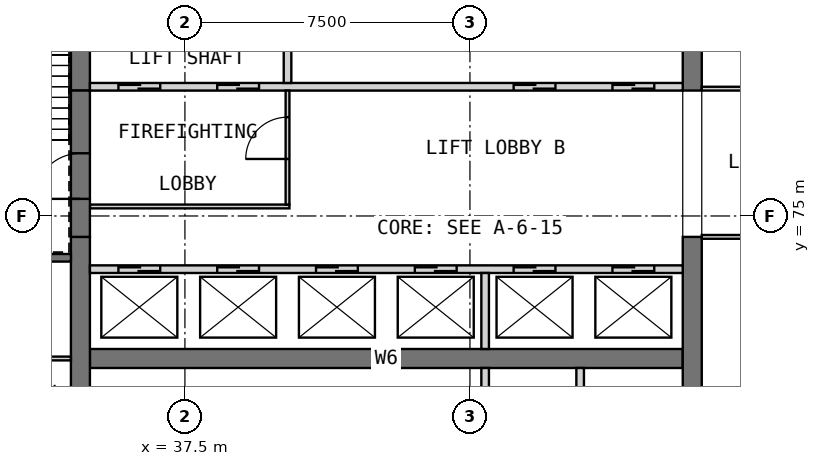
"""IFC4 building model, lengths in metres.
Left out: names, types, materials, properties, quantities, classifications, styles, units other than length and angle.
Written with IfcOpenShell. Run it as: python <this file> out.ifc"""

import sys

from ifc_helpers import new_model, si_unit, direction, frame, frame_2d, origin, place, context, subcontext, project, spatial, rectangle, extrude, element, fill, save


model = new_model("IFC4")
c1 = context("Model", 3, precision=1e-05, world=origin(), true_north=direction((0.0, 1.0)))
c2 = subcontext(c1, "Body", "Model", "MODEL_VIEW")
j1 = project(units=[si_unit("LENGTHUNIT", "METRE"), si_unit("PLANEANGLEUNIT", "RADIAN")], contexts=[c1])
p1 = place(None, origin())
s1 = spatial("IfcSite", under=j1, at=p1, CompositionType="ELEMENT")
p2 = place(p1, origin())
s2 = spatial("IfcBuilding", under=s1, at=p2, CompositionType="ELEMENT")
p3 = place(p2, frame((0.0, 0.0, 124.2)))
s3 = spatial("IfcBuildingStorey", under=s2, at=p3, CompositionType="ELEMENT", Elevation=124.2)
p4 = place(p3, frame((35.0, 71.25, 0.0), z_axis=(0.0, 0.0, 1.0), x_axis=(1.0, 0.0, 0.0)))
e1 = element("IfcWall", 1, at=p4, inside=s3, PredefinedType="SHEAR", context=c2, shape_type="SweptSolid", body=[
    extrude(rectangle(XDim=15.6, YDim=0.5, at=frame_2d((7.8, 0.0))), origin(), (0.0, 0.0, 1.0), 6.0),
])
p5 = place(p3, frame((34.75, 68.05, 0.0), z_axis=(0.0, 0.0, 1.0), x_axis=(0.0, 1.0, 0.0)))
e2 = element("IfcWall", 2, at=p5, inside=s3, PredefinedType="SHEAR", context=c2, shape_type="SweptSolid", body=[
    extrude(rectangle(XDim=6.4, YDim=0.5, at=frame_2d((3.2, 0.0))), origin(), (0.0, 0.0, 1.0), 6.0),
])
p6 = place(p3, frame((34.75, 78.3, 0.0), z_axis=(0.0, 0.0, 1.0), x_axis=(0.0, 1.0, 0.0)))
e3 = element("IfcWall", 3, at=p6, inside=s3, PredefinedType="SHEAR", context=c2, shape_type="SweptSolid", body=[
    extrude(rectangle(XDim=3.4, YDim=0.5, at=frame_2d((1.7, 0.0))), origin(), (0.0, 0.0, 1.0), 6.0),
])
p7 = place(p3, frame((50.85, 68.05, 0.0), z_axis=(0.0, 0.0, 1.0), x_axis=(0.0, 1.0, 0.0)))
e4 = element("IfcWall", 4, at=p7, inside=s3, PredefinedType="SHEAR", context=c2, shape_type="SweptSolid", body=[
    extrude(rectangle(XDim=6.4, YDim=0.5, at=frame_2d((3.2, 0.0))), origin(), (0.0, 0.0, 1.0), 6.0),
])
p8 = place(p3, frame((50.85, 78.3, 0.0), z_axis=(0.0, 0.0, 1.0), x_axis=(0.0, 1.0, 0.0)))
e5 = element("IfcWall", 5, at=p8, inside=s3, PredefinedType="SHEAR", context=c2, shape_type="SweptSolid", body=[
    extrude(rectangle(XDim=3.4, YDim=0.5, at=frame_2d((1.7, 0.0))), origin(), (0.0, 0.0, 1.0), 6.0),
])
for number, where, z_axis, x_axis in (
    (6, (45.4, 68.25, 0.0), (0.0, 0.0, 1.0), (0.0, 1.0, 0.0)),
    (7, (47.9, 68.25, 0.0), (0.0, 0.0, 1.0), (0.0, 1.0, 0.0)),
):
    element("IfcWall", number, at=place(p3, frame(where, z_axis=z_axis, x_axis=x_axis)), inside=s3, PredefinedType="SOLIDWALL", context=c2, shape_type="SweptSolid", body=[
        extrude(rectangle(XDim=2.75, YDim=0.2, at=frame_2d((1.375, 0.0))), origin(), (0.0, 0.0, 1.0), 6.0),
    ])
p9 = place(p3, frame((35.0, 73.6, 0.0), z_axis=(0.0, 0.0, 1.0), x_axis=(1.0, 0.0, 0.0)))
e8 = element("IfcWall", 8, at=p9, inside=s3, PredefinedType="SOLIDWALL", context=c2, shape_type="SweptSolid", body=[
    extrude(rectangle(XDim=15.6, YDim=0.2, at=frame_2d((7.8, 0.0))), origin(), (0.0, 0.0, 1.0), 6.0),
])
p10 = place(p9, frame((0.75, 0.0, 0.0)))
e9 = element("IfcOpeningElement", 9, at=p10, cuts=e8, PredefinedType="OPENING", context=c2, shape_type="SweptSolid", body=[
    extrude(rectangle(XDim=1.1, YDim=2.1, at=frame_2d((0.55, 1.05))), frame((0.0, 0.11, 0.0), z_axis=(0.0, -1.0, 0.0), x_axis=(1.0, 0.0, 0.0)), (0.0, 0.0, 1.0), 0.22),
])
p11 = place(p9, frame((3.35, 0.0, 0.0)))
e10 = element("IfcOpeningElement", 10, at=p11, cuts=e8, PredefinedType="OPENING", context=c2, shape_type="SweptSolid", body=[
    extrude(rectangle(XDim=1.1, YDim=2.1, at=frame_2d((0.55, 1.05))), frame((0.0, 0.11, 0.0), z_axis=(0.0, -1.0, 0.0), x_axis=(1.0, 0.0, 0.0)), (0.0, 0.0, 1.0), 0.22),
])
p12 = place(p9, frame((5.95, 0.0, 0.0)))
e11 = element("IfcOpeningElement", 11, at=p12, cuts=e8, PredefinedType="OPENING", context=c2, shape_type="SweptSolid", body=[
    extrude(rectangle(XDim=1.1, YDim=2.1, at=frame_2d((0.55, 1.05))), frame((0.0, 0.11, 0.0), z_axis=(0.0, -1.0, 0.0), x_axis=(1.0, 0.0, 0.0)), (0.0, 0.0, 1.0), 0.22),
])
p13 = place(p9, frame((8.55, 0.0, 0.0)))
e12 = element("IfcOpeningElement", 12, at=p13, cuts=e8, PredefinedType="OPENING", context=c2, shape_type="SweptSolid", body=[
    extrude(rectangle(XDim=1.1, YDim=2.1, at=frame_2d((0.55, 1.05))), frame((0.0, 0.11, 0.0), z_axis=(0.0, -1.0, 0.0), x_axis=(1.0, 0.0, 0.0)), (0.0, 0.0, 1.0), 0.22),
])
p14 = place(p9, frame((11.15, 0.0, 0.0)))
e13 = element("IfcOpeningElement", 13, at=p14, cuts=e8, PredefinedType="OPENING", context=c2, shape_type="SweptSolid", body=[
    extrude(rectangle(XDim=1.1, YDim=2.1, at=frame_2d((0.55, 1.05))), frame((0.0, 0.11, 0.0), z_axis=(0.0, -1.0, 0.0), x_axis=(1.0, 0.0, 0.0)), (0.0, 0.0, 1.0), 0.22),
])
p15 = place(p9, frame((13.75, 0.0, 0.0)))
e14 = element("IfcOpeningElement", 14, at=p15, cuts=e8, PredefinedType="OPENING", context=c2, shape_type="SweptSolid", body=[
    extrude(rectangle(XDim=1.1, YDim=2.1, at=frame_2d((0.55, 1.05))), frame((0.0, 0.11, 0.0), z_axis=(0.0, -1.0, 0.0), x_axis=(1.0, 0.0, 0.0)), (0.0, 0.0, 1.0), 0.22),
])
p16 = place(p3, frame((45.4, 71.5, 0.0), z_axis=(0.0, 0.0, 1.0), x_axis=(0.0, 1.0, 0.0)))
e15 = element("IfcWall", 15, at=p16, inside=s3, PredefinedType="SOLIDWALL", context=c2, shape_type="SweptSolid", body=[
    extrude(rectangle(XDim=2.0, YDim=0.2, at=frame_2d((1.0, 0.0))), origin(), (0.0, 0.0, 1.0), 6.0),
])
p17 = place(p3, frame((35.0, 78.4, 0.0), z_axis=(0.0, 0.0, 1.0), x_axis=(1.0, 0.0, 0.0)))
e16 = element("IfcWall", 16, at=p17, inside=s3, PredefinedType="SOLIDWALL", context=c2, shape_type="SweptSolid", body=[
    extrude(rectangle(XDim=15.6, YDim=0.2, at=frame_2d((7.8, 0.0))), origin(), (0.0, 0.0, 1.0), 6.0),
])
p18 = place(p17, frame((0.75, 0.0, 0.0)))
e17 = element("IfcOpeningElement", 17, at=p18, cuts=e16, PredefinedType="OPENING", context=c2, shape_type="SweptSolid", body=[
    extrude(rectangle(XDim=1.1, YDim=2.1, at=frame_2d((0.55, 1.05))), frame((0.0, 0.11, 0.0), z_axis=(0.0, -1.0, 0.0), x_axis=(1.0, 0.0, 0.0)), (0.0, 0.0, 1.0), 0.22),
])
p19 = place(p17, frame((3.35, 0.0, 0.0)))
e18 = element("IfcOpeningElement", 18, at=p19, cuts=e16, PredefinedType="OPENING", context=c2, shape_type="SweptSolid", body=[
    extrude(rectangle(XDim=1.1, YDim=2.1, at=frame_2d((0.55, 1.05))), frame((0.0, 0.11, 0.0), z_axis=(0.0, -1.0, 0.0), x_axis=(1.0, 0.0, 0.0)), (0.0, 0.0, 1.0), 0.22),
])
p20 = place(p17, frame((11.15, 0.0, 0.0)))
e19 = element("IfcOpeningElement", 19, at=p20, cuts=e16, PredefinedType="OPENING", context=c2, shape_type="SweptSolid", body=[
    extrude(rectangle(XDim=1.1, YDim=2.1, at=frame_2d((0.55, 1.05))), frame((0.0, 0.11, 0.0), z_axis=(0.0, -1.0, 0.0), x_axis=(1.0, 0.0, 0.0)), (0.0, 0.0, 1.0), 0.22),
])
p21 = place(p17, frame((13.75, 0.0, 0.0)))
e20 = element("IfcOpeningElement", 20, at=p21, cuts=e16, PredefinedType="OPENING", context=c2, shape_type="SweptSolid", body=[
    extrude(rectangle(XDim=1.1, YDim=2.1, at=frame_2d((0.55, 1.05))), frame((0.0, 0.11, 0.0), z_axis=(0.0, -1.0, 0.0), x_axis=(1.0, 0.0, 0.0)), (0.0, 0.0, 1.0), 0.22),
])
p22 = place(p3, frame((40.2, 78.5, 0.0), z_axis=(0.0, 0.0, 1.0), x_axis=(0.0, 1.0, 0.0)))
e21 = element("IfcWall", 21, at=p22, inside=s3, PredefinedType="SOLIDWALL", context=c2, shape_type="SweptSolid", body=[
    extrude(rectangle(XDim=3.2, YDim=0.2, at=frame_2d((1.6, 0.0))), origin(), (0.0, 0.0, 1.0), 6.0),
])
p23 = place(p3, frame((35.0, 75.25, 0.0), z_axis=(0.0, 0.0, 1.0), x_axis=(1.0, 0.0, 0.0)))
e22 = element("IfcWall", 22, at=p23, inside=s3, PredefinedType="PARTITIONING", context=c2, shape_type="SweptSolid", body=[
    extrude(rectangle(XDim=5.25, YDim=0.1, at=frame_2d((2.625, 0.0))), origin(), (0.0, 0.0, 1.0), 5.75),
])
p24 = place(p3, frame((40.2, 75.3, 0.0), z_axis=(0.0, 0.0, 1.0), x_axis=(0.0, 1.0, 0.0)))
e23 = element("IfcWall", 23, at=p24, inside=s3, PredefinedType="PARTITIONING", context=c2, shape_type="SweptSolid", body=[
    extrude(rectangle(XDim=3.0, YDim=0.1, at=frame_2d((1.5, 0.0))), origin(), (0.0, 0.0, 1.0), 5.75),
])
p25 = place(p24, frame((1.2, 0.0, 0.0)))
e24 = element("IfcOpeningElement", 24, at=p25, cuts=e23, PredefinedType="OPENING", context=c2, shape_type="SweptSolid", body=[
    extrude(rectangle(XDim=1.1, YDim=2.1, at=frame_2d((0.55, 1.05))), frame((0.0, 0.06, 0.0), z_axis=(0.0, -1.0, 0.0), x_axis=(1.0, 0.0, 0.0)), (0.0, 0.0, 1.0), 0.12),
])
p26 = place(p3, frame((34.75, 74.45, 0.0), z_axis=(0.0, 0.0, 1.0), x_axis=(0.0, 1.0, 0.0)))
e25 = element("IfcWall", 25, at=p26, inside=s3, PredefinedType="SOLIDWALL", context=c2, shape_type="SweptSolid", body=[
    extrude(rectangle(XDim=3.85, YDim=0.5, at=frame_2d((1.925, 0.0))), origin(), (0.0, 0.0, 1.0), 4.8),
])
p27 = place(p26, frame((1.0, 0.0, 0.0)))
e26 = element("IfcOpeningElement", 26, at=p27, cuts=e25, PredefinedType="OPENING", context=c2, shape_type="SweptSolid", body=[
    extrude(rectangle(XDim=1.2, YDim=2.1, at=frame_2d((0.6, 1.05))), frame((0.0, 0.26, 0.0), z_axis=(0.0, -1.0, 0.0), x_axis=(1.0, 0.0, 0.0)), (0.0, 0.0, 1.0), 0.52),
])
p28 = place(p3, frame((30.8, 73.9, 0.0), z_axis=(0.0, 0.0, 1.0), x_axis=(1.0, 0.0, 0.0)))
e27 = element("IfcWall", 27, at=p28, inside=s3, PredefinedType="SOLIDWALL", context=c2, shape_type="SweptSolid", body=[
    extrude(rectangle(XDim=3.7, YDim=0.2, at=frame_2d((1.85, 0.0))), origin(), (0.0, 0.0, 1.0), 5.75),
])
p29 = place(p28, frame((1.5, 0.0, 0.0)))
e28 = element("IfcOpeningElement", 28, at=p29, cuts=e27, PredefinedType="OPENING", context=c2, shape_type="SweptSolid", body=[
    extrude(rectangle(XDim=0.9, YDim=2.1, at=frame_2d((0.45, 1.05))), frame((0.0, 0.11, 0.0), z_axis=(0.0, -1.0, 0.0), x_axis=(1.0, 0.0, 0.0)), (0.0, 0.0, 1.0), 0.22),
])
p30 = place(p3, frame((30.8, 71.25, 0.0), z_axis=(0.0, 0.0, 1.0), x_axis=(1.0, 0.0, 0.0)))
e29 = element("IfcWall", 29, at=p30, inside=s3, PredefinedType="PARTITIONING", context=c2, shape_type="SweptSolid", body=[
    extrude(rectangle(XDim=3.7, YDim=0.1, at=frame_2d((1.85, 0.0))), origin(), (0.0, 0.0, 1.0), 5.75),
])
p31 = place(p3, frame((51.1, 74.45, 0.0), z_axis=(0.0, 0.0, 1.0), x_axis=(1.0, 0.0, 0.0)))
e30 = element("IfcWall", 30, at=p31, inside=s3, PredefinedType="PARTITIONING", context=c2, shape_type="SweptSolid", body=[
    extrude(rectangle(XDim=8.1, YDim=0.1, at=frame_2d((4.05, 0.0))), origin(), (0.0, 0.0, 1.0), 5.75),
])
p32 = place(p31, frame((3.6, 0.0, 0.0)))
e31 = element("IfcOpeningElement", 31, at=p32, cuts=e30, PredefinedType="OPENING", context=c2, shape_type="SweptSolid", body=[
    extrude(rectangle(XDim=0.9, YDim=2.1, at=frame_2d((0.45, 1.05))), frame((0.0, 0.06, 0.0), z_axis=(0.0, -1.0, 0.0), x_axis=(1.0, 0.0, 0.0)), (0.0, 0.0, 1.0), 0.12),
])
p33 = place(p3, frame((51.1, 78.35, 0.0), z_axis=(0.0, 0.0, 1.0), x_axis=(1.0, 0.0, 0.0)))
e32 = element("IfcWall", 32, at=p33, inside=s3, PredefinedType="PARTITIONING", context=c2, shape_type="SweptSolid", body=[
    extrude(rectangle(XDim=8.1, YDim=0.1, at=frame_2d((4.05, 0.0))), origin(), (0.0, 0.0, 1.0), 5.75),
])
p34 = place(p33, frame((3.6, 0.0, 0.0)))
e33 = element("IfcOpeningElement", 33, at=p34, cuts=e32, PredefinedType="OPENING", context=c2, shape_type="SweptSolid", body=[
    extrude(rectangle(XDim=0.9, YDim=2.1, at=frame_2d((0.45, 1.05))), frame((0.0, 0.06, 0.0), z_axis=(0.0, -1.0, 0.0), x_axis=(1.0, 0.0, 0.0)), (0.0, 0.0, 1.0), 0.12),
])
p35 = place(p10, origin())
e34 = element("IfcDoor", 34, at=p35, inside=s3, OperationType="DOUBLE_DOOR_SLIDING", PredefinedType="DOOR", context=c2, shape_type="SweptSolid", body=[
    extrude(rectangle(XDim=1.1, YDim=2.1, at=frame_2d((0.55, 1.05))), frame((0.0, 0.025, 0.0), z_axis=(0.0, -1.0, 0.0), x_axis=(1.0, 0.0, 0.0)), (0.0, 0.0, 1.0), 0.05),
])
fill(e9, e34)
p36 = place(p11, origin())
e35 = element("IfcDoor", 35, at=p36, inside=s3, OperationType="DOUBLE_DOOR_SLIDING", PredefinedType="DOOR", context=c2, shape_type="SweptSolid", body=[
    extrude(rectangle(XDim=1.1, YDim=2.1, at=frame_2d((0.55, 1.05))), frame((0.0, 0.025, 0.0), z_axis=(0.0, -1.0, 0.0), x_axis=(1.0, 0.0, 0.0)), (0.0, 0.0, 1.0), 0.05),
])
fill(e10, e35)
p37 = place(p12, origin())
e36 = element("IfcDoor", 36, at=p37, inside=s3, OperationType="DOUBLE_DOOR_SLIDING", PredefinedType="DOOR", context=c2, shape_type="SweptSolid", body=[
    extrude(rectangle(XDim=1.1, YDim=2.1, at=frame_2d((0.55, 1.05))), frame((0.0, 0.025, 0.0), z_axis=(0.0, -1.0, 0.0), x_axis=(1.0, 0.0, 0.0)), (0.0, 0.0, 1.0), 0.05),
])
fill(e11, e36)
p38 = place(p13, origin())
e37 = element("IfcDoor", 37, at=p38, inside=s3, OperationType="DOUBLE_DOOR_SLIDING", PredefinedType="DOOR", context=c2, shape_type="SweptSolid", body=[
    extrude(rectangle(XDim=1.1, YDim=2.1, at=frame_2d((0.55, 1.05))), frame((0.0, 0.025, 0.0), z_axis=(0.0, -1.0, 0.0), x_axis=(1.0, 0.0, 0.0)), (0.0, 0.0, 1.0), 0.05),
])
fill(e12, e37)
p39 = place(p14, origin())
e38 = element("IfcDoor", 38, at=p39, inside=s3, OperationType="DOUBLE_DOOR_SLIDING", PredefinedType="DOOR", context=c2, shape_type="SweptSolid", body=[
    extrude(rectangle(XDim=1.1, YDim=2.1, at=frame_2d((0.55, 1.05))), frame((0.0, 0.025, 0.0), z_axis=(0.0, -1.0, 0.0), x_axis=(1.0, 0.0, 0.0)), (0.0, 0.0, 1.0), 0.05),
])
fill(e13, e38)
p40 = place(p15, origin())
e39 = element("IfcDoor", 39, at=p40, inside=s3, OperationType="DOUBLE_DOOR_SLIDING", PredefinedType="DOOR", context=c2, shape_type="SweptSolid", body=[
    extrude(rectangle(XDim=1.1, YDim=2.1, at=frame_2d((0.55, 1.05))), frame((0.0, 0.025, 0.0), z_axis=(0.0, -1.0, 0.0), x_axis=(1.0, 0.0, 0.0)), (0.0, 0.0, 1.0), 0.05),
])
fill(e14, e39)
p41 = place(p18, origin())
e40 = element("IfcDoor", 40, at=p41, inside=s3, OperationType="DOUBLE_DOOR_SLIDING", PredefinedType="DOOR", context=c2, shape_type="SweptSolid", body=[
    extrude(rectangle(XDim=1.1, YDim=2.1, at=frame_2d((0.55, 1.05))), frame((0.0, 0.025, 0.0), z_axis=(0.0, -1.0, 0.0), x_axis=(1.0, 0.0, 0.0)), (0.0, 0.0, 1.0), 0.05),
])
fill(e17, e40)
p42 = place(p19, origin())
e41 = element("IfcDoor", 41, at=p42, inside=s3, OperationType="DOUBLE_DOOR_SLIDING", PredefinedType="DOOR", context=c2, shape_type="SweptSolid", body=[
    extrude(rectangle(XDim=1.1, YDim=2.1, at=frame_2d((0.55, 1.05))), frame((0.0, 0.025, 0.0), z_axis=(0.0, -1.0, 0.0), x_axis=(1.0, 0.0, 0.0)), (0.0, 0.0, 1.0), 0.05),
])
fill(e18, e41)
p43 = place(p20, origin())
e42 = element("IfcDoor", 42, at=p43, inside=s3, OperationType="DOUBLE_DOOR_SLIDING", PredefinedType="DOOR", context=c2, shape_type="SweptSolid", body=[
    extrude(rectangle(XDim=1.1, YDim=2.1, at=frame_2d((0.55, 1.05))), frame((0.0, 0.025, 0.0), z_axis=(0.0, -1.0, 0.0), x_axis=(1.0, 0.0, 0.0)), (0.0, 0.0, 1.0), 0.05),
])
fill(e19, e42)
p44 = place(p21, origin())
e43 = element("IfcDoor", 43, at=p44, inside=s3, OperationType="DOUBLE_DOOR_SLIDING", PredefinedType="DOOR", context=c2, shape_type="SweptSolid", body=[
    extrude(rectangle(XDim=1.1, YDim=2.1, at=frame_2d((0.55, 1.05))), frame((0.0, 0.025, 0.0), z_axis=(0.0, -1.0, 0.0), x_axis=(1.0, 0.0, 0.0)), (0.0, 0.0, 1.0), 0.05),
])
fill(e20, e43)
p45 = place(p25, origin())
e44 = element("IfcDoor", 44, at=p45, inside=s3, OperationType="SINGLE_SWING_LEFT", PredefinedType="DOOR", context=c2, shape_type="SweptSolid", body=[
    extrude(rectangle(XDim=1.1, YDim=2.1, at=frame_2d((0.55, 1.05))), frame((0.0, 0.025, 0.0), z_axis=(0.0, -1.0, 0.0), x_axis=(1.0, 0.0, 0.0)), (0.0, 0.0, 1.0), 0.05),
])
fill(e24, e44)
p46 = place(p27, origin())
e45 = element("IfcDoor", 45, at=p46, inside=s3, OperationType="SINGLE_SWING_RIGHT", PredefinedType="DOOR", context=c2, shape_type="SweptSolid", body=[
    extrude(rectangle(XDim=1.2, YDim=2.1, at=frame_2d((0.6, 1.05))), frame((0.0, 0.025, 0.0), z_axis=(0.0, -1.0, 0.0), x_axis=(1.0, 0.0, 0.0)), (0.0, 0.0, 1.0), 0.05),
])
fill(e26, e45)
save(model, sys.argv[1])
